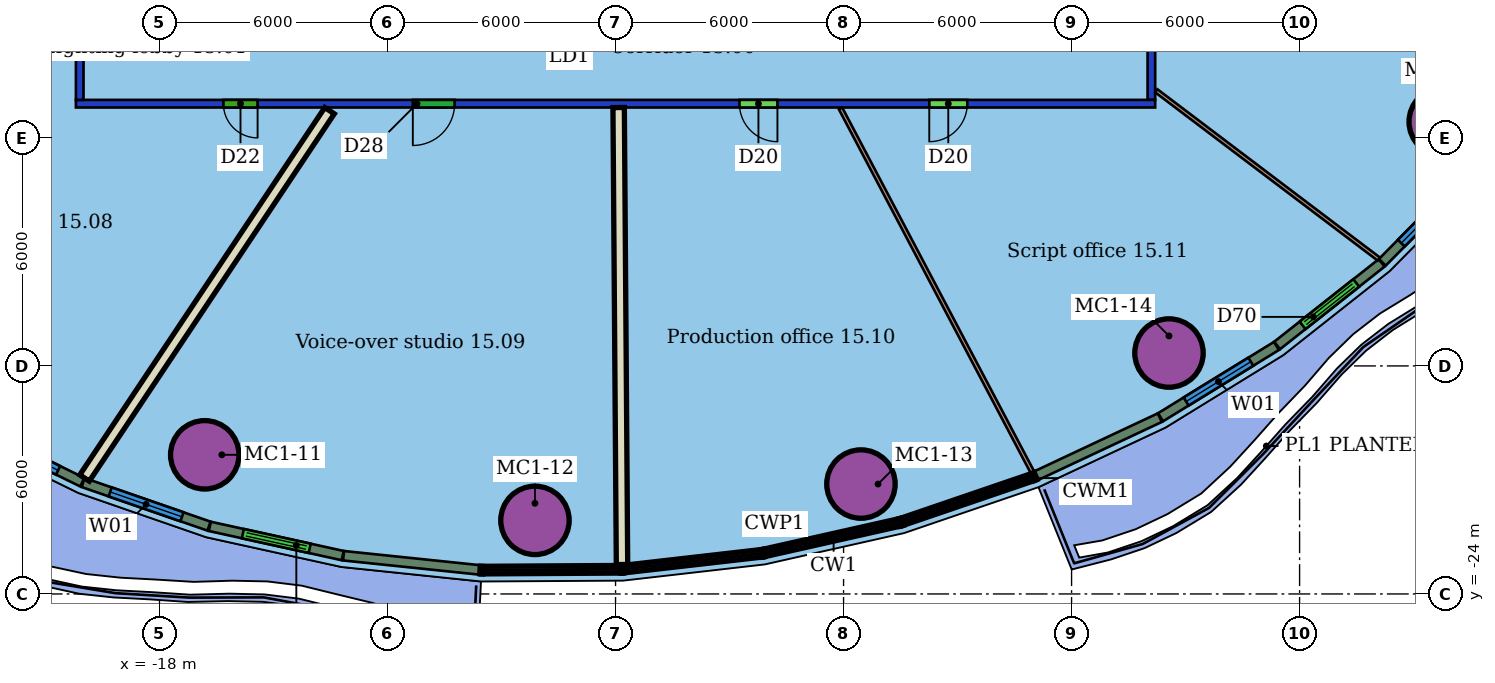
"""IFC4 building model, lengths in metres.
Left out: names, types, materials, properties, quantities, classifications, styles, units other than length and angle.
Written with IfcOpenShell. Run it as: python <this file> out.ifc"""

import sys

from ifc_helpers import new_model, si_unit, direction, frame, frame_2d, origin, origin_2d, place, context, subcontext, project, spatial, rectangle, hollow_circle, extrude, element, fill, save


model = new_model("IFC4")
c1 = context("Model", 3, precision=1e-05, world=origin(), true_north=direction((0.0, 1.0)))
c2 = subcontext(c1, "Body", "Model", "MODEL_VIEW")
j1 = project(units=[si_unit("LENGTHUNIT", "METRE"), si_unit("PLANEANGLEUNIT", "RADIAN")], contexts=[c1])
p1 = place(None, origin())
s1 = spatial("IfcSite", under=j1, at=p1, CompositionType="ELEMENT")
p2 = place(p1, origin())
s2 = spatial("IfcBuilding", under=s1, at=p2, CompositionType="ELEMENT")
p3 = place(p2, frame((0.0, 0.0, 73.0)))
s3 = spatial("IfcBuildingStorey", under=s2, at=p3, CompositionType="ELEMENT", Elevation=73.0)
for number, where, z_axis, x_axis in (
    (1, (-16.81, -20.339, 0.0), (0.0, 0.0, 1.0), (1.0, 0.0, 0.0)),
    (2, (-8.121, -22.064, 0.0), (0.0, 0.0, 1.0), (1.0, 0.0, 0.0)),
    (3, (0.458, -21.108, 0.0), (0.0, 0.0, 1.0), (1.0, 0.0, 0.0)),
    (4, (8.563, -17.66, 0.0), (0.0, 0.0, 1.0), (1.0, 0.0, 0.0)),
    (5, (15.78, -11.576, 0.0), (0.0, 0.0, 1.0), (1.0, 0.0, 0.0)),
):
    element("IfcColumn", number, at=place(p3, frame(where, z_axis=z_axis, x_axis=x_axis)), inside=s3, PredefinedType="COLUMN", context=c2, shape_type="SweptSolid", body=[
        extrude(hollow_circle(Radius=0.9, WallThickness=0.06, at=origin_2d()), origin(), (0.0, 0.0, 1.0), 3.55),
    ])
p4 = place(p3, frame((8.2, -11.1, 0.0), z_axis=(0.0, 0.0, 1.0), x_axis=(-1.0, 0.0, 0.0)))
e6 = element("IfcWall", 6, at=p4, inside=s3, PredefinedType="PARTITIONING", context=c2, shape_type="SweptSolid", body=[
    extrude(rectangle(XDim=28.4, YDim=0.2, at=frame_2d((14.2, 0.0))), origin(), (0.0, 0.0, 1.0), 2.85),
])
p5 = place(p4, frame((23.619, 0.0, 0.0)))
e7 = element("IfcOpeningElement", 7, at=p5, cuts=e6, PredefinedType="OPENING", context=c2, shape_type="SweptSolid", body=[
    extrude(rectangle(XDim=0.9, YDim=2.1, at=frame_2d((0.45, 1.05))), frame((0.0, 0.11, 0.0), z_axis=(0.0, -1.0, 0.0), x_axis=(1.0, 0.0, 0.0)), (0.0, 0.0, 1.0), 0.22),
])
p6 = place(p4, frame((18.435, 0.0, 0.0)))
e8 = element("IfcOpeningElement", 8, at=p6, cuts=e6, PredefinedType="OPENING", context=c2, shape_type="SweptSolid", body=[
    extrude(rectangle(XDim=1.1, YDim=2.1, at=frame_2d((0.55, 1.05))), frame((0.0, 0.11, 0.0), z_axis=(0.0, -1.0, 0.0), x_axis=(1.0, 0.0, 0.0)), (0.0, 0.0, 1.0), 0.22),
])
p7 = place(p4, frame((9.94, 0.0, 0.0)))
e9 = element("IfcOpeningElement", 9, at=p7, cuts=e6, PredefinedType="OPENING", context=c2, shape_type="SweptSolid", body=[
    extrude(rectangle(XDim=1.0, YDim=2.1, at=frame_2d((0.5, 1.05))), frame((0.0, 0.11, 0.0), z_axis=(0.0, -1.0, 0.0), x_axis=(1.0, 0.0, 0.0)), (0.0, 0.0, 1.0), 0.22),
])
p8 = place(p4, frame((4.945, 0.0, 0.0)))
e10 = element("IfcOpeningElement", 10, at=p8, cuts=e6, PredefinedType="OPENING", context=c2, shape_type="SweptSolid", body=[
    extrude(rectangle(XDim=1.0, YDim=2.1, at=frame_2d((0.5, 1.05))), frame((0.0, 0.11, 0.0), z_axis=(0.0, -1.0, 0.0), x_axis=(1.0, 0.0, 0.0)), (0.0, 0.0, 1.0), 0.22),
])
p9 = place(p3, frame((-20.1, -11.0, 0.0), z_axis=(0.0, 0.0, 1.0), x_axis=(0.0, 1.0, 0.0)))
e11 = element("IfcWall", 11, at=p9, inside=s3, PredefinedType="PARTITIONING", context=c2, shape_type="SweptSolid", body=[
    extrude(rectangle(XDim=22.0, YDim=0.2, at=frame_2d((11.0, 0.0))), origin(), (0.0, 0.0, 1.0), 2.85),
])
p10 = place(p9, frame((18.354, 0.0, 0.0)))
e12 = element("IfcOpeningElement", 12, at=p10, cuts=e11, PredefinedType="OPENING", context=c2, shape_type="SweptSolid", body=[
    extrude(rectangle(XDim=1.0, YDim=2.1, at=frame_2d((0.5, 1.05))), frame((0.0, 0.11, 0.0), z_axis=(0.0, -1.0, 0.0), x_axis=(1.0, 0.0, 0.0)), (0.0, 0.0, 1.0), 0.22),
])
p11 = place(p9, frame((13.865, 0.0, 0.0)))
e13 = element("IfcOpeningElement", 13, at=p11, cuts=e11, PredefinedType="OPENING", context=c2, shape_type="SweptSolid", body=[
    extrude(rectangle(XDim=1.1, YDim=2.1, at=frame_2d((0.55, 1.05))), frame((0.0, 0.11, 0.0), z_axis=(0.0, -1.0, 0.0), x_axis=(1.0, 0.0, 0.0)), (0.0, 0.0, 1.0), 0.22),
])
p12 = place(p9, frame((5.305, 0.0, 0.0)))
e14 = element("IfcOpeningElement", 14, at=p12, cuts=e11, PredefinedType="OPENING", context=c2, shape_type="SweptSolid", body=[
    extrude(rectangle(XDim=1.0, YDim=2.1, at=frame_2d((0.5, 1.05))), frame((0.0, 0.11, 0.0), z_axis=(0.0, -1.0, 0.0), x_axis=(1.0, 0.0, 0.0)), (0.0, 0.0, 1.0), 0.22),
])
p13 = place(p3, frame((8.1, 11.0, 0.0), z_axis=(0.0, 0.0, 1.0), x_axis=(0.0, -1.0, 0.0)))
e15 = element("IfcWall", 15, at=p13, inside=s3, PredefinedType="PARTITIONING", context=c2, shape_type="SweptSolid", body=[
    extrude(rectangle(XDim=22.0, YDim=0.2, at=frame_2d((11.0, 0.0))), origin(), (0.0, 0.0, 1.0), 2.85),
])
p14 = place(p13, frame((13.246, 0.0, 0.0)))
e16 = element("IfcOpeningElement", 16, at=p14, cuts=e15, PredefinedType="OPENING", context=c2, shape_type="SweptSolid", body=[
    extrude(rectangle(XDim=1.8, YDim=2.1, at=frame_2d((0.9, 1.05))), frame((0.0, 0.11, 0.0), z_axis=(0.0, -1.0, 0.0), x_axis=(1.0, 0.0, 0.0)), (0.0, 0.0, 1.0), 0.22),
])
p15 = place(p13, frame((6.607, 0.0, 0.0)))
e17 = element("IfcOpeningElement", 17, at=p15, cuts=e15, PredefinedType="OPENING", context=c2, shape_type="SweptSolid", body=[
    extrude(rectangle(XDim=0.9, YDim=2.1, at=frame_2d((0.45, 1.05))), frame((0.0, 0.11, 0.0), z_axis=(0.0, -1.0, 0.0), x_axis=(1.0, 0.0, 0.0)), (0.0, 0.0, 1.0), 0.22),
])
p16 = place(p3, frame((-30.337, -13.063, 0.0), z_axis=(0.0, 0.0, 1.0), x_axis=(0.881100754634, 0.472928599456, 0.0)))
e18 = element("IfcWall", 18, at=p16, inside=s3, PredefinedType="PARTITIONING", context=c2, shape_type="SweptSolid", body=[
    extrude(rectangle(XDim=11.465, YDim=0.15, at=frame_2d((5.732, 0.0))), origin(), (0.0, 0.0, 1.0), 3.55),
])
p17 = place(p3, frame((-19.973, -20.949, 0.0), z_axis=(0.0, 0.0, 1.0), x_axis=(0.554894141309, 0.831920964961, 0.0)))
e19 = element("IfcWall", 19, at=p17, inside=s3, PredefinedType="PARTITIONING", context=c2, shape_type="SweptSolid", body=[
    extrude(rectangle(XDim=11.619, YDim=0.3, at=frame_2d((5.81, 0.0))), origin(), (0.0, 0.0, 1.0), 3.55),
])
p18 = place(p3, frame((-5.83, -23.226, 0.0), z_axis=(0.0, 0.0, 1.0), x_axis=(-0.007309152595, 0.999973287787, 0.0)))
e20 = element("IfcWall", 20, at=p18, inside=s3, PredefinedType="PARTITIONING", context=c2, shape_type="SweptSolid", body=[
    extrude(rectangle(XDim=12.025, YDim=0.3, at=frame_2d((6.012, 0.0))), origin(), (0.0, 0.0, 1.0), 3.55),
])
p19 = place(p3, frame((4.97, -20.797, 0.0), z_axis=(0.0, 0.0, 1.0), x_axis=(-0.466551313445, 0.884494133346, 0.0)))
e21 = element("IfcWall", 21, at=p19, inside=s3, PredefinedType="PARTITIONING", context=c2, shape_type="SweptSolid", body=[
    extrude(rectangle(XDim=10.824, YDim=0.1, at=frame_2d((5.412, 0.0))), origin(), (0.0, 0.0, 1.0), 3.55),
])
p20 = place(p3, frame((14.085, -15.189, 0.0), z_axis=(0.0, 0.0, 1.0), x_axis=(-0.797607036042, 0.603177433311, 0.0)))
e22 = element("IfcWall", 22, at=p20, inside=s3, PredefinedType="PARTITIONING", context=c2, shape_type="SweptSolid", body=[
    extrude(rectangle(XDim=7.341, YDim=0.1, at=frame_2d((3.67, 0.0))), origin(), (0.0, 0.0, 1.0), 3.55),
])
p21 = place(p3, frame((-23.102, -19.555, 0.0), z_axis=(0.0, 0.0, 1.0), x_axis=(0.89802471606, -0.439945007184, 0.0)))
e23 = element("IfcWall", 23, at=p21, inside=s3, PredefinedType="SOLIDWALL", context=c2, shape_type="SweptSolid", body=[
    extrude(rectangle(XDim=3.419, YDim=0.25, at=frame_2d((1.71, 0.0))), origin(), (0.0, 0.0, 1.0), 3.15),
])
p22 = place(p21, frame((0.71, 0.0, 0.8)))
e24 = element("IfcOpeningElement", 24, at=p22, cuts=e23, PredefinedType="OPENING", context=c2, shape_type="SweptSolid", body=[
    extrude(rectangle(XDim=2.0, YDim=2.2, at=frame_2d((1.0, 1.1))), frame((0.0, 0.135, 0.0), z_axis=(0.0, -1.0, 0.0), x_axis=(1.0, 0.0, 0.0)), (0.0, 0.0, 1.0), 0.27),
])
p23 = place(p3, frame((-20.01, -21.069, 0.0), z_axis=(0.0, 0.0, 1.0), x_axis=(0.944948803813, -0.327218211861, 0.0)))
e25 = element("IfcWall", 25, at=p23, inside=s3, PredefinedType="SOLIDWALL", context=c2, shape_type="SweptSolid", body=[
    extrude(rectangle(XDim=3.505, YDim=0.25, at=frame_2d((1.752, 0.0))), origin(), (0.0, 0.0, 1.0), 3.15),
])
p24 = place(p23, frame((0.753, 0.0, 0.8)))
e26 = element("IfcOpeningElement", 26, at=p24, cuts=e25, PredefinedType="OPENING", context=c2, shape_type="SweptSolid", body=[
    extrude(rectangle(XDim=2.0, YDim=2.2, at=frame_2d((1.0, 1.1))), frame((0.0, 0.135, 0.0), z_axis=(0.0, -1.0, 0.0), x_axis=(1.0, 0.0, 0.0)), (0.0, 0.0, 1.0), 0.27),
])
p25 = place(p3, frame((-16.676, -22.222, 0.0), z_axis=(0.0, 0.0, 1.0), x_axis=(0.976653338545, -0.214821452162, 0.0)))
e27 = element("IfcWall", 27, at=p25, inside=s3, PredefinedType="SOLIDWALL", context=c2, shape_type="SweptSolid", body=[
    extrude(rectangle(XDim=3.58, YDim=0.25, at=frame_2d((1.79, 0.0))), origin(), (0.0, 0.0, 1.0), 3.15),
])
p26 = place(p25, frame((0.89, 0.0, 0.0)))
e28 = element("IfcOpeningElement", 28, at=p26, cuts=e27, PredefinedType="OPENING", context=c2, shape_type="SweptSolid", body=[
    extrude(rectangle(XDim=1.8, YDim=2.4, at=frame_2d((0.9, 1.2))), frame((0.0, 0.135, 0.0), z_axis=(0.0, -1.0, 0.0), x_axis=(1.0, 0.0, 0.0)), (0.0, 0.0, 1.0), 0.27),
])
p27 = place(p3, frame((-13.157, -22.994, 0.0), z_axis=(0.0, 0.0, 1.0), x_axis=(0.994624966302, -0.10354311377, 0.0)))
e29 = element("IfcWall", 29, at=p27, inside=s3, PredefinedType="SOLIDWALL", context=c2, shape_type="SweptSolid", body=[
    extrude(rectangle(XDim=3.596, YDim=0.25, at=frame_2d((1.798, 0.0))), origin(), (0.0, 0.0, 1.0), 3.15),
])
p28 = place(p3, frame((5.066, -20.889, 0.0), z_axis=(0.0, 0.0, 1.0), x_axis=(0.905219888946, 0.424943469955, 0.0)))
e30 = element("IfcWall", 30, at=p28, inside=s3, PredefinedType="SOLIDWALL", context=c2, shape_type="SweptSolid", body=[
    extrude(rectangle(XDim=3.596, YDim=0.25, at=frame_2d((1.798, 0.0))), origin(), (0.0, 0.0, 1.0), 3.15),
])
p29 = place(p3, frame((8.341, -19.351, 0.0), z_axis=(0.0, 0.0, 1.0), x_axis=(0.851723868461, 0.523990889132, 0.0)))
e31 = element("IfcWall", 31, at=p29, inside=s3, PredefinedType="SOLIDWALL", context=c2, shape_type="SweptSolid", body=[
    extrude(rectangle(XDim=3.58, YDim=0.25, at=frame_2d((1.79, 0.0))), origin(), (0.0, 0.0, 1.0), 3.15),
])
p30 = place(p29, frame((0.79, 0.0, 0.8)))
e32 = element("IfcOpeningElement", 32, at=p30, cuts=e31, PredefinedType="OPENING", context=c2, shape_type="SweptSolid", body=[
    extrude(rectangle(XDim=2.0, YDim=2.2, at=frame_2d((1.0, 1.1))), frame((0.0, 0.135, 0.0), z_axis=(0.0, -1.0, 0.0), x_axis=(1.0, 0.0, 0.0)), (0.0, 0.0, 1.0), 0.27),
])
p31 = place(p3, frame((11.408, -17.462, 0.0), z_axis=(0.0, 0.0, 1.0), x_axis=(0.784747250061, 0.619815902928, 0.0)))
e33 = element("IfcWall", 33, at=p31, inside=s3, PredefinedType="SOLIDWALL", context=c2, shape_type="SweptSolid", body=[
    extrude(rectangle(XDim=3.505, YDim=0.25, at=frame_2d((1.752, 0.0))), origin(), (0.0, 0.0, 1.0), 3.15),
])
p32 = place(p31, frame((0.853, 0.0, 0.0)))
e34 = element("IfcOpeningElement", 34, at=p32, cuts=e33, PredefinedType="OPENING", context=c2, shape_type="SweptSolid", body=[
    extrude(rectangle(XDim=1.8, YDim=2.4, at=frame_2d((0.9, 1.2))), frame((0.0, 0.135, 0.0), z_axis=(0.0, -1.0, 0.0), x_axis=(1.0, 0.0, 0.0)), (0.0, 0.0, 1.0), 0.27),
])
p33 = place(p3, frame((14.177, -15.274, 0.0), z_axis=(0.0, 0.0, 1.0), x_axis=(0.703348795403, 0.710844900105, 0.0)))
e35 = element("IfcWall", 35, at=p33, inside=s3, PredefinedType="SOLIDWALL", context=c2, shape_type="SweptSolid", body=[
    extrude(rectangle(XDim=3.42, YDim=0.25, at=frame_2d((1.71, 0.0))), origin(), (0.0, 0.0, 1.0), 3.15),
])
p34 = place(p33, frame((0.71, 0.0, 0.8)))
e36 = element("IfcOpeningElement", 36, at=p34, cuts=e35, PredefinedType="OPENING", context=c2, shape_type="SweptSolid", body=[
    extrude(rectangle(XDim=2.0, YDim=2.2, at=frame_2d((1.0, 1.1))), frame((0.0, 0.135, 0.0), z_axis=(0.0, -1.0, 0.0), x_axis=(1.0, 0.0, 0.0)), (0.0, 0.0, 1.0), 0.27),
])
p35 = place(p5, origin())
e37 = element("IfcDoor", 37, at=p35, inside=s3, OperationType="SINGLE_SWING_LEFT", PredefinedType="DOOR", context=c2, shape_type="SweptSolid", body=[
    extrude(rectangle(XDim=0.9, YDim=2.1, at=frame_2d((0.45, 1.05))), frame((0.0, 0.025, 0.0), z_axis=(0.0, -1.0, 0.0), x_axis=(1.0, 0.0, 0.0)), (0.0, 0.0, 1.0), 0.05),
])
fill(e7, e37)
p36 = place(p6, origin())
e38 = element("IfcDoor", 38, at=p36, inside=s3, OperationType="SINGLE_SWING_RIGHT", PredefinedType="DOOR", context=c2, shape_type="SweptSolid", body=[
    extrude(rectangle(XDim=1.1, YDim=2.1, at=frame_2d((0.55, 1.05))), frame((0.0, 0.025, 0.0), z_axis=(0.0, -1.0, 0.0), x_axis=(1.0, 0.0, 0.0)), (0.0, 0.0, 1.0), 0.05),
])
fill(e8, e38)
p37 = place(p7, origin())
e39 = element("IfcDoor", 39, at=p37, inside=s3, OperationType="SINGLE_SWING_LEFT", PredefinedType="DOOR", context=c2, shape_type="SweptSolid", body=[
    extrude(rectangle(XDim=1.0, YDim=2.1, at=frame_2d((0.5, 1.05))), frame((0.0, 0.025, 0.0), z_axis=(0.0, -1.0, 0.0), x_axis=(1.0, 0.0, 0.0)), (0.0, 0.0, 1.0), 0.05),
])
fill(e9, e39)
p38 = place(p8, origin())
e40 = element("IfcDoor", 40, at=p38, inside=s3, OperationType="SINGLE_SWING_RIGHT", PredefinedType="DOOR", context=c2, shape_type="SweptSolid", body=[
    extrude(rectangle(XDim=1.0, YDim=2.1, at=frame_2d((0.5, 1.05))), frame((0.0, 0.025, 0.0), z_axis=(0.0, -1.0, 0.0), x_axis=(1.0, 0.0, 0.0)), (0.0, 0.0, 1.0), 0.05),
])
fill(e10, e40)
p39 = place(p22, origin())
e41 = element("IfcWindow", 41, at=p39, inside=s3, PartitioningType="SINGLE_PANEL", PredefinedType="WINDOW", context=c2, shape_type="SweptSolid", body=[
    extrude(rectangle(XDim=2.0, YDim=2.2, at=frame_2d((1.0, 1.1))), frame((0.0, 0.03, 0.0), z_axis=(0.0, -1.0, 0.0), x_axis=(1.0, 0.0, 0.0)), (0.0, 0.0, 1.0), 0.06),
])
fill(e24, e41)
p40 = place(p24, origin())
e42 = element("IfcWindow", 42, at=p40, inside=s3, PartitioningType="SINGLE_PANEL", PredefinedType="WINDOW", context=c2, shape_type="SweptSolid", body=[
    extrude(rectangle(XDim=2.0, YDim=2.2, at=frame_2d((1.0, 1.1))), frame((0.0, 0.03, 0.0), z_axis=(0.0, -1.0, 0.0), x_axis=(1.0, 0.0, 0.0)), (0.0, 0.0, 1.0), 0.06),
])
fill(e26, e42)
p41 = place(p26, origin())
e43 = element("IfcDoor", 43, at=p41, inside=s3, OperationType="DOUBLE_DOOR_SLIDING", PredefinedType="DOOR", context=c2, shape_type="SweptSolid", body=[
    extrude(rectangle(XDim=1.8, YDim=2.4, at=frame_2d((0.9, 1.2))), frame((0.0, 0.025, 0.0), z_axis=(0.0, -1.0, 0.0), x_axis=(1.0, 0.0, 0.0)), (0.0, 0.0, 1.0), 0.05),
])
fill(e28, e43)
p42 = place(p30, origin())
e44 = element("IfcWindow", 44, at=p42, inside=s3, PartitioningType="SINGLE_PANEL", PredefinedType="WINDOW", context=c2, shape_type="SweptSolid", body=[
    extrude(rectangle(XDim=2.0, YDim=2.2, at=frame_2d((1.0, 1.1))), frame((0.0, 0.03, 0.0), z_axis=(0.0, -1.0, 0.0), x_axis=(1.0, 0.0, 0.0)), (0.0, 0.0, 1.0), 0.06),
])
fill(e32, e44)
p43 = place(p32, origin())
e45 = element("IfcDoor", 45, at=p43, inside=s3, OperationType="DOUBLE_DOOR_SLIDING", PredefinedType="DOOR", context=c2, shape_type="SweptSolid", body=[
    extrude(rectangle(XDim=1.8, YDim=2.4, at=frame_2d((0.9, 1.2))), frame((0.0, 0.025, 0.0), z_axis=(0.0, -1.0, 0.0), x_axis=(1.0, 0.0, 0.0)), (0.0, 0.0, 1.0), 0.05),
])
fill(e34, e45)
p44 = place(p34, origin())
e46 = element("IfcWindow", 46, at=p44, inside=s3, PartitioningType="SINGLE_PANEL", PredefinedType="WINDOW", context=c2, shape_type="SweptSolid", body=[
    extrude(rectangle(XDim=2.0, YDim=2.2, at=frame_2d((1.0, 1.1))), frame((0.0, 0.03, 0.0), z_axis=(0.0, -1.0, 0.0), x_axis=(1.0, 0.0, 0.0)), (0.0, 0.0, 1.0), 0.06),
])
fill(e36, e46)
save(model, sys.argv[1])
